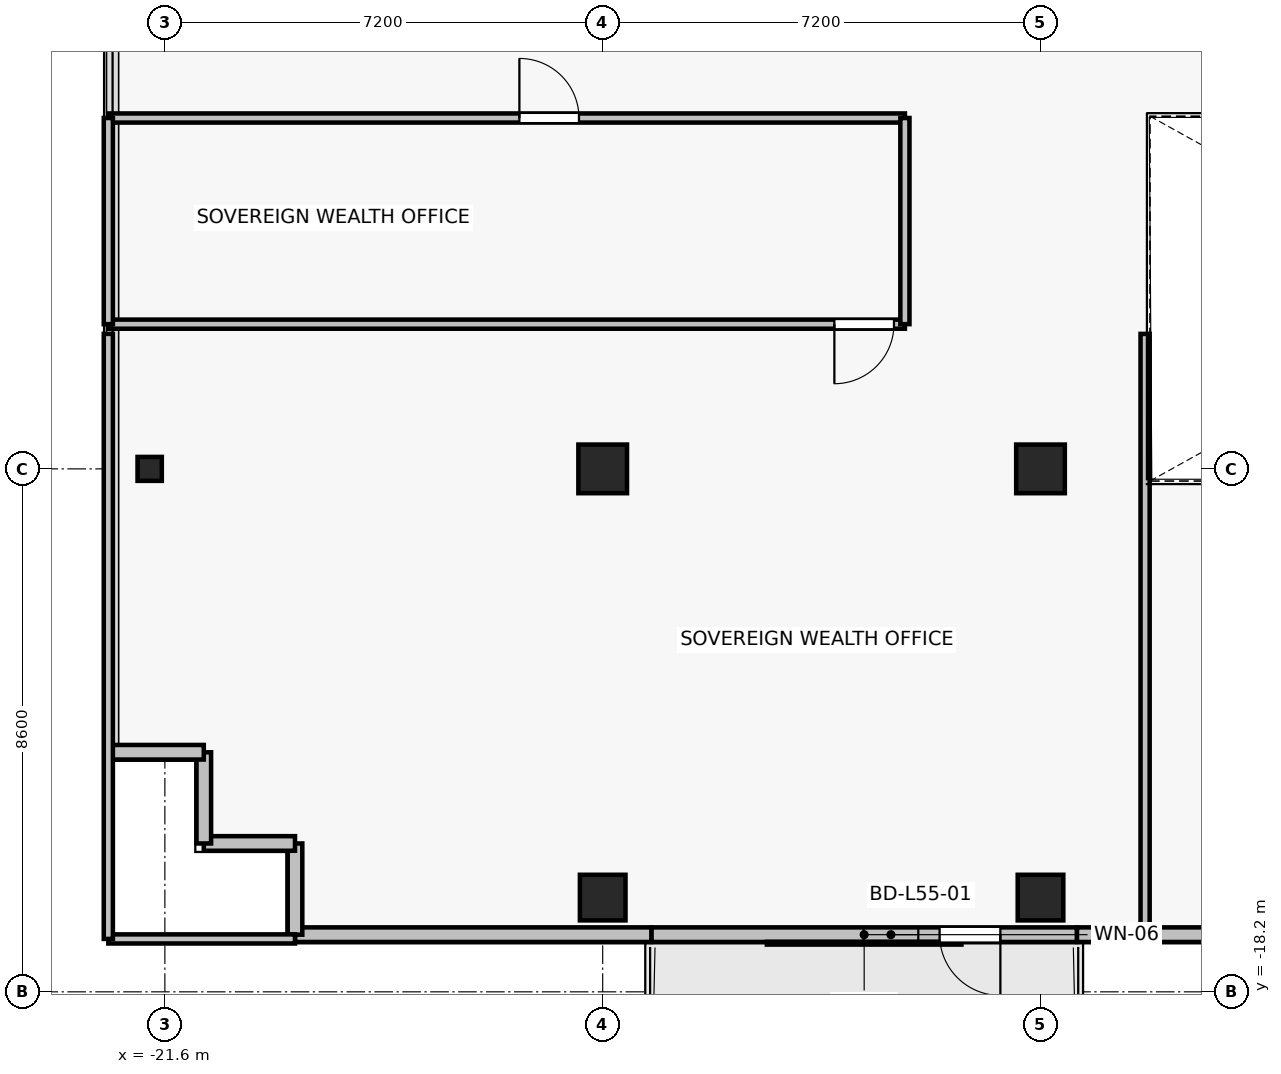
"""IFC4 building model, lengths in metres.
Left out: names, types, materials, properties, quantities, classifications, styles, units other than length and angle.
Written with IfcOpenShell. Run it as: python <this file> out.ifc"""

import sys

from ifc_helpers import new_model, si_unit, direction, frame, frame_2d, origin, origin_2d, place, context, subcontext, project, spatial, rectangle, i_section, extrude, source, transform, mapped, element, fill, save


model = new_model("IFC4")
c1 = context("Model", 3, precision=1e-05, world=origin(), true_north=direction((0.0, 1.0)))
c2 = subcontext(c1, "Body", "Model", "MODEL_VIEW")
j1 = project(units=[si_unit("LENGTHUNIT", "METRE"), si_unit("PLANEANGLEUNIT", "RADIAN")], contexts=[c1])
p1 = place(None, origin())
s1 = spatial("IfcSite", under=j1, at=p1, CompositionType="ELEMENT")
p2 = place(p1, origin())
s2 = spatial("IfcBuilding", under=s1, at=p2, CompositionType="ELEMENT")
p3 = place(p2, frame((0.0, 0.0, 195.7)))
s3 = spatial("IfcBuildingStorey", under=s2, at=p3, CompositionType="ELEMENT", Elevation=195.7)
for number, where, z_axis, x_axis in (
    (1, (-14.4, -9.6, 0.0), (0.0, 0.0, 1.0), (1.0, 0.0, 0.0)),
    (2, (-7.2, -9.6, 0.0), (0.0, 0.0, 1.0), (1.0, 0.0, 0.0)),
):
    element("IfcColumn", number, at=place(p3, frame(where, z_axis=z_axis, x_axis=x_axis)), inside=s3, PredefinedType="COLUMN", context=c2, shape_type="SweptSolid", body=[
        extrude(rectangle(XDim=0.8, YDim=0.8, at=origin_2d()), origin(), (0.0, 0.0, 1.0), 3.3),
    ])
for number, where, z_axis, x_axis in (
    (3, (-14.4, -16.65, 0.0), (0.0, 0.0, 1.0), (1.0, 0.0, 0.0)),
    (4, (-7.2, -16.65, 0.0), (0.0, 0.0, 1.0), (1.0, 0.0, 0.0)),
):
    element("IfcColumn", number, at=place(p3, frame(where, z_axis=z_axis, x_axis=x_axis)), inside=s3, PredefinedType="COLUMN", context=c2, shape_type="SweptSolid", body=[
        extrude(rectangle(XDim=0.75, YDim=0.75, at=origin_2d()), origin(), (0.0, 0.0, 1.0), 3.3),
    ])
p4 = place(p3, frame((-21.85, -9.6, 0.0), z_axis=(0.0, 0.0, 1.0), x_axis=(1.0, 0.0, 0.0)))
e5 = element("IfcColumn", 5, at=p4, inside=s3, PredefinedType="COLUMN", context=c2, shape_type="SweptSolid", body=[
    extrude(i_section(OverallWidth=0.399, OverallDepth=0.394, WebThickness=0.023, FlangeThickness=0.037, FilletRadius=0.015, at=origin_2d()), origin(), (0.0, 0.0, 1.0), 3.3),
])
p5 = place(p3, frame((-6.6, -17.26, 0.0), z_axis=(0.0, 0.0, 1.0), x_axis=(-1.0, 0.0, 0.0)))
e6 = element("IfcWall", 6, at=p5, inside=s3, PredefinedType="SOLIDWALL", context=c2, shape_type="SweptSolid", body=[
    extrude(rectangle(XDim=7.0, YDim=0.24, at=frame_2d((3.5, 0.0))), origin(), (0.0, 0.0, 1.0), 3.05),
])
p6 = place(p5, frame((1.26, 0.0, 0.0)))
e7 = element("IfcOpeningElement", 7, at=p6, cuts=e6, PredefinedType="OPENING", context=c2, shape_type="SweptSolid", body=[
    extrude(rectangle(XDim=1.0, YDim=2.2, at=frame_2d((0.5, 1.1))), frame((0.0, 0.13, 0.0), z_axis=(0.0, -1.0, 0.0), x_axis=(1.0, 0.0, 0.0)), (0.0, 0.0, 1.0), 0.26),
])
p7 = place(p5, frame((2.61, 0.0, 0.85)))
e8 = element("IfcOpeningElement", 8, at=p7, cuts=e6, PredefinedType="OPENING", context=c2, shape_type="SweptSolid", body=[
    extrude(rectangle(XDim=0.9, YDim=1.35, at=frame_2d((0.45, 0.675))), frame((0.0, 0.13, 0.0), z_axis=(0.0, -1.0, 0.0), x_axis=(1.0, 0.0, 0.0)), (0.0, 0.0, 1.0), 0.26),
])
p8 = place(p3, frame((-6.6, -17.26, 0.0), z_axis=(0.0, 0.0, 1.0), x_axis=(1.0, 0.0, 0.0)))
e9 = element("IfcWall", 9, at=p8, inside=s3, PredefinedType="SOLIDWALL", context=c2, shape_type="SweptSolid", body=[
    extrude(rectangle(XDim=3.4, YDim=0.24, at=frame_2d((1.7, 0.0))), origin(), (0.0, 0.0, 1.0), 3.05),
])
p9 = place(p3, frame((-19.46, -17.26, 0.0), z_axis=(0.0, 0.0, 1.0), x_axis=(1.0, 0.0, 0.0)))
e10 = element("IfcWall", 10, at=p9, inside=s3, PredefinedType="SOLIDWALL", context=c2, shape_type="SweptSolid", body=[
    extrude(rectangle(XDim=5.86, YDim=0.24, at=frame_2d((2.93, 0.0))), origin(), (0.0, 0.0, 1.0), 3.05),
])
for number, where, z_axis, x_axis in (
    (11, (-19.46, -15.76, 0.0), (0.0, 0.0, 1.0), (0.0, -1.0, 0.0)),
    (12, (-20.96, -15.76, 0.0), (0.0, 0.0, 1.0), (1.0, 0.0, 0.0)),
    (13, (-20.96, -14.26, 0.0), (0.0, 0.0, 1.0), (0.0, -1.0, 0.0)),
    (14, (-22.46, -14.26, 0.0), (0.0, 0.0, 1.0), (1.0, 0.0, 0.0)),
):
    element("IfcWall", number, at=place(p3, frame(where, z_axis=z_axis, x_axis=x_axis)), inside=s3, PredefinedType="SOLIDWALL", context=c2, shape_type="SweptSolid", body=[
        extrude(rectangle(XDim=1.5, YDim=0.24, at=frame_2d((0.75, 0.0))), origin(), (0.0, 0.0, 1.0), 3.05),
    ])
p10 = place(p3, frame((-9.43, -7.22, 0.0), z_axis=(0.0, 0.0, 1.0), x_axis=(-1.0, 0.0, 0.0)))
e15 = element("IfcWall", 15, at=p10, inside=s3, PredefinedType="PARTITIONING", context=c2, shape_type="SweptSolid", body=[
    extrude(rectangle(XDim=13.1, YDim=0.15, at=frame_2d((6.55, 0.0))), origin(), (0.0, 0.0, 1.0), 2.54),
])
p11 = place(p10, frame((0.18, 0.0, 0.0)))
e16 = element("IfcOpeningElement", 16, at=p11, cuts=e15, PredefinedType="OPENING", context=c2, shape_type="SweptSolid", body=[
    extrude(rectangle(XDim=0.98, YDim=2.15, at=frame_2d((0.49, 1.075))), frame((0.0, 0.085, 0.0), z_axis=(0.0, -1.0, 0.0), x_axis=(1.0, 0.0, 0.0)), (0.0, 0.0, 1.0), 0.17),
])
p12 = place(p3, frame((-22.53, -3.83, 0.0), z_axis=(0.0, 0.0, 1.0), x_axis=(1.0, 0.0, 0.0)))
e17 = element("IfcWall", 17, at=p12, inside=s3, PredefinedType="PARTITIONING", context=c2, shape_type="SweptSolid", body=[
    extrude(rectangle(XDim=13.1, YDim=0.15, at=frame_2d((6.55, 0.0))), origin(), (0.0, 0.0, 1.0), 2.54),
])
p13 = place(p12, frame((6.76, 0.0, 0.0)))
e18 = element("IfcOpeningElement", 18, at=p13, cuts=e17, PredefinedType="OPENING", context=c2, shape_type="SweptSolid", body=[
    extrude(rectangle(XDim=0.98, YDim=2.15, at=frame_2d((0.49, 1.075))), frame((0.0, 0.085, 0.0), z_axis=(0.0, -1.0, 0.0), x_axis=(1.0, 0.0, 0.0)), (0.0, 0.0, 1.0), 0.17),
])
p14 = place(p3, frame((-22.53, -7.22, 0.0), z_axis=(0.0, 0.0, 1.0), x_axis=(0.0, 1.0, 0.0)))
e19 = element("IfcWall", 19, at=p14, inside=s3, PredefinedType="PARTITIONING", context=c2, shape_type="SweptSolid", body=[
    extrude(rectangle(XDim=3.39, YDim=0.15, at=frame_2d((1.695, 0.0))), origin(), (0.0, 0.0, 1.0), 3.05),
])
p15 = place(p3, frame((-9.43, -3.83, 0.0), z_axis=(0.0, 0.0, 1.0), x_axis=(0.0, -1.0, 0.0)))
e20 = element("IfcWall", 20, at=p15, inside=s3, PredefinedType="PARTITIONING", context=c2, shape_type="SweptSolid", body=[
    extrude(rectangle(XDim=3.39, YDim=0.15, at=frame_2d((1.695, 0.0))), origin(), (0.0, 0.0, 1.0), 2.64),
])
p16 = place(p3, frame((-19.46, -17.33, 0.0), z_axis=(0.0, 0.0, 1.0), x_axis=(-1.0, 0.0, 0.0)))
e21 = element("IfcWall", 21, at=p16, inside=s3, PredefinedType="PARTITIONING", context=c2, shape_type="SweptSolid", body=[
    extrude(rectangle(XDim=3.07, YDim=0.15, at=frame_2d((1.535, 0.0))), origin(), (0.0, 0.0, 1.0), 3.05),
])
p17 = place(p3, frame((-22.53, -17.33, 0.0), z_axis=(0.0, 0.0, 1.0), x_axis=(0.0, 1.0, 0.0)))
e22 = element("IfcWall", 22, at=p17, inside=s3, PredefinedType="PARTITIONING", context=c2, shape_type="SweptSolid", body=[
    extrude(rectangle(XDim=9.95, YDim=0.15, at=frame_2d((4.975, 0.0))), origin(), (0.0, 0.0, 1.0), 3.05),
])
p18 = place(p3, frame((-5.48, -7.38, 0.0), z_axis=(0.0, 0.0, 1.0), x_axis=(0.0, -1.0, 0.0)))
e23 = element("IfcWall", 23, at=p18, inside=s3, PredefinedType="PARTITIONING", context=c2, shape_type="SweptSolid", body=[
    extrude(rectangle(XDim=9.95, YDim=0.15, at=frame_2d((4.975, 0.0))), origin(), (0.0, 0.0, 1.0), 2.54),
])
m1 = source(origin(), c2, "Body", "SweptSolid", [
    extrude(rectangle(XDim=1.0, YDim=2.2, at=frame_2d((0.5, 1.1))), frame((0.0, 0.025, 0.0), z_axis=(0.0, -1.0, 0.0), x_axis=(1.0, 0.0, 0.0)), (0.0, 0.0, 1.0), 0.05),
])
p19 = place(p6, origin())
e24 = element("IfcDoor", 24, at=p19, inside=s3, OperationType="SINGLE_SWING_LEFT", PredefinedType="DOOR", context=c2, shape_type="MappedRepresentation", body=[
    mapped(m1, transform((0.0, 0.0, 0.0), x_axis=(1.0, 0.0, 0.0), y_axis=(0.0, 1.0, 0.0), z_axis=(0.0, 0.0, 1.0), scale=1.0)),
])
fill(e7, e24)
m2 = source(origin(), c2, "Body", "SweptSolid", [
    extrude(rectangle(XDim=0.9, YDim=1.35, at=frame_2d((0.45, 0.675))), frame((0.0, 0.03, 0.0), z_axis=(0.0, -1.0, 0.0), x_axis=(1.0, 0.0, 0.0)), (0.0, 0.0, 1.0), 0.06),
])
p20 = place(p7, origin())
e25 = element("IfcWindow", 25, at=p20, inside=s3, PartitioningType="SINGLE_PANEL", PredefinedType="WINDOW", context=c2, shape_type="MappedRepresentation", body=[
    mapped(m2, transform((0.0, 0.0, 0.0), x_axis=(1.0, 0.0, 0.0), y_axis=(0.0, 1.0, 0.0), z_axis=(0.0, 0.0, 1.0), scale=1.0)),
])
fill(e8, e25)
m3 = source(origin(), c2, "Body", "SweptSolid", [
    extrude(rectangle(XDim=0.98, YDim=2.15, at=frame_2d((0.49, 1.075))), frame((0.0, 0.025, 0.0), z_axis=(0.0, -1.0, 0.0), x_axis=(1.0, 0.0, 0.0)), (0.0, 0.0, 1.0), 0.05),
])
p21 = place(p13, origin())
e26 = element("IfcDoor", 26, at=p21, inside=s3, OperationType="SINGLE_SWING_LEFT", PredefinedType="DOOR", context=c2, shape_type="MappedRepresentation", body=[
    mapped(m3, transform((0.0, 0.0, 0.0), x_axis=(1.0, 0.0, 0.0), y_axis=(0.0, 1.0, 0.0), z_axis=(0.0, 0.0, 1.0), scale=1.0)),
])
fill(e18, e26)
p22 = place(p11, origin())
e27 = element("IfcDoor", 27, at=p22, inside=s3, OperationType="SINGLE_SWING_RIGHT", PredefinedType="DOOR", context=c2, shape_type="MappedRepresentation", body=[
    mapped(m3, transform((0.0, 0.0, 0.0), x_axis=(1.0, 0.0, 0.0), y_axis=(0.0, 1.0, 0.0), z_axis=(0.0, 0.0, 1.0), scale=1.0)),
])
fill(e16, e27)
save(model, sys.argv[1])
